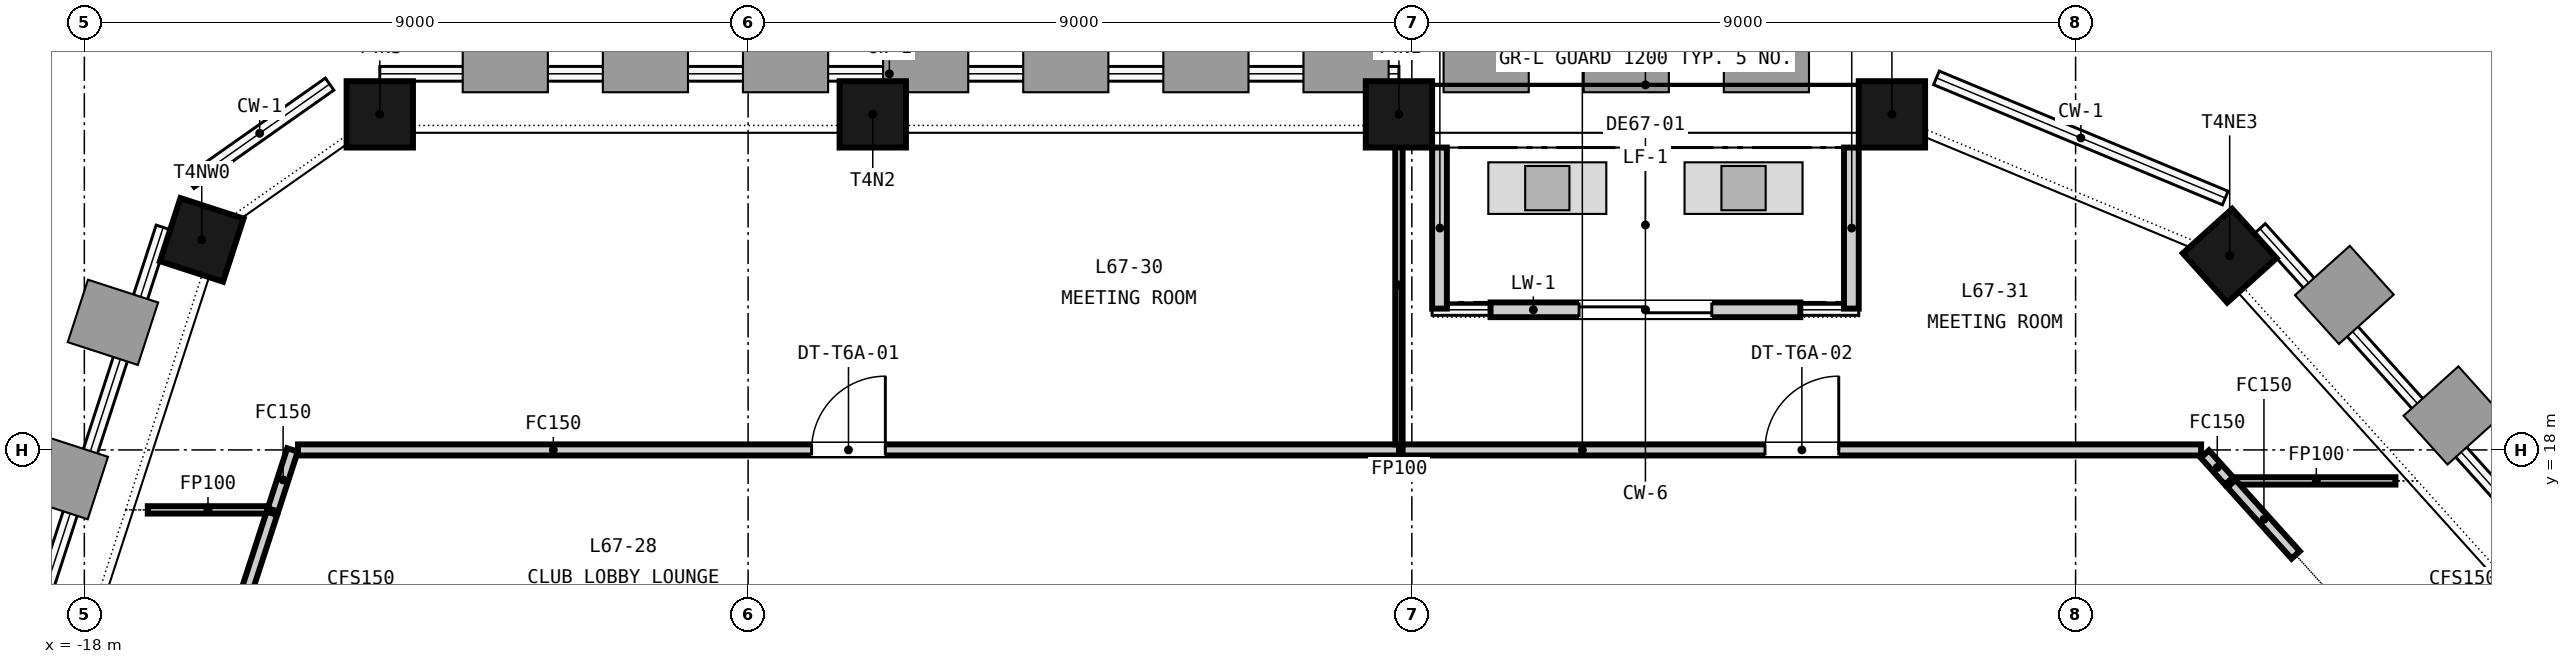
"""IFC4 building model, lengths in metres.
Left out: names, types, materials, properties, quantities, classifications, styles, units other than length and angle.
Written with IfcOpenShell. Run it as: python <this file> out.ifc"""

import sys

from ifc_helpers import new_model, si_unit, direction, frame, frame_2d, origin, origin_2d, place, context, subcontext, project, spatial, rectangle, extrude, element, fill, save


model = new_model("IFC4")
c1 = context("Model", 3, precision=1e-05, world=origin(), true_north=direction((0.0, 1.0)))
c2 = subcontext(c1, "Body", "Model", "MODEL_VIEW")
j1 = project(units=[si_unit("LENGTHUNIT", "METRE"), si_unit("PLANEANGLEUNIT", "RADIAN")], contexts=[c1])
p1 = place(None, origin())
s1 = spatial("IfcSite", under=j1, at=p1, CompositionType="ELEMENT")
p2 = place(p1, origin())
s2 = spatial("IfcBuilding", under=s1, at=p2, CompositionType="ELEMENT")
p3 = place(p2, frame((0.0, 0.0, 264.6)))
s3 = spatial("IfcBuildingStorey", under=s2, at=p3, CompositionType="ELEMENT", Elevation=264.6)
for number, where, z_axis, x_axis in (
    (1, (6.51, 22.55, -0.15), (0.0, 0.0, 1.0), (-1.0, 0.0, 0.0)),
    (2, (-0.175, 22.55, -0.15), (0.0, 0.0, 1.0), (-1.0, 0.0, 0.0)),
    (3, (-7.31, 22.55, -0.15), (0.0, 0.0, 1.0), (-1.0, 0.0, 0.0)),
    (4, (-13.994, 22.55, -0.15), (0.0, 0.0, 1.0), (-1.0, 0.0, 0.0)),
    (5, (-16.408, 20.848, -0.15), (0.0, 0.0, 1.0), (-0.309, -0.951, 0.0)),
    (6, (11.089, 20.633, -0.15), (0.0, 0.0, 1.0), (-0.669, 0.743, 0.0)),
):
    element("IfcColumn", number, at=place(p3, frame(where, z_axis=z_axis, x_axis=x_axis)), inside=s3, PredefinedType="COLUMN", context=c2, shape_type="SweptSolid", body=[
        extrude(rectangle(XDim=0.9, YDim=0.9, at=origin_2d()), origin(), (0.0, 0.0, 1.0), 3.65),
    ])
p4 = place(p3, frame((5.267, 19.9, 0.0), z_axis=(0.0, 0.0, 1.0), x_axis=(-1.0, 0.0, 0.0)))
e7 = element("IfcWall", 7, at=p4, inside=s3, PredefinedType="SOLIDWALL", context=c2, shape_type="SweptSolid", body=[
    extrude(rectangle(XDim=4.2, YDim=0.2, at=frame_2d((2.1, 0.0))), origin(), (0.0, 0.0, 1.0), 2.9),
])
p5 = place(p4, frame((1.2, 0.0, 0.0)))
e8 = element("IfcOpeningElement", 8, at=p5, cuts=e7, PredefinedType="OPENING", context=c2, shape_type="SweptSolid", body=[
    extrude(rectangle(XDim=1.8, YDim=2.4, at=frame_2d((0.9, 1.2))), frame((0.0, 0.11, 0.0), z_axis=(0.0, -1.0, 0.0), x_axis=(1.0, 0.0, 0.0)), (0.0, 0.0, 1.0), 0.22),
])
for number, where, z_axis, x_axis in (
    (9, (5.959, 22.1, 0.0), (0.0, 0.0, 1.0), (0.0, -1.0, 0.0)),
    (10, (0.375, 22.1, 0.0), (0.0, 0.0, 1.0), (0.0, -1.0, 0.0)),
):
    element("IfcWall", number, at=place(p3, frame(where, z_axis=z_axis, x_axis=x_axis)), inside=s3, PredefinedType="SOLIDWALL", context=c2, shape_type="SweptSolid", body=[
        extrude(rectangle(XDim=2.184, YDim=0.2, at=frame_2d((1.092, 0.0))), origin(), (0.0, 0.0, 1.0), 3.05),
    ])
p6 = place(p3, frame((-15.442, 17.187, 0.0), z_axis=(0.0, 0.0, 1.0), x_axis=(0.308763129345, 0.951138964588, 0.0)))
e11 = element("IfcWall", 11, at=p6, inside=s3, PredefinedType="PARTITIONING", context=c2, shape_type="SweptSolid", body=[
    extrude(rectangle(XDim=0.855, YDim=0.15, at=frame_2d((0.427, 0.0))), origin(), (0.0, 0.0, 1.0), 2.75),
])
p7 = place(p3, frame((-15.103, 18.0, 0.0), z_axis=(0.0, 0.0, 1.0), x_axis=(1.0, 0.0, 0.0)))
e12 = element("IfcWall", 12, at=p7, inside=s3, PredefinedType="PARTITIONING", context=c2, shape_type="SweptSolid", body=[
    extrude(rectangle(XDim=14.928, YDim=0.15, at=frame_2d((7.464, 0.0))), origin(), (0.0, 0.0, 1.0), 2.75),
])
p8 = place(p7, frame((6.964, 0.0, 0.0)))
e13 = element("IfcOpeningElement", 13, at=p8, cuts=e12, PredefinedType="OPENING", context=c2, shape_type="SweptSolid", body=[
    extrude(rectangle(XDim=1.0, YDim=2.1, at=frame_2d((0.5, 1.05))), frame((0.0, 0.085, 0.0), z_axis=(0.0, -1.0, 0.0), x_axis=(1.0, 0.0, 0.0)), (0.0, 0.0, 1.0), 0.17),
])
p9 = place(p3, frame((-0.175, 18.075, 0.0), z_axis=(0.0, 0.0, 1.0), x_axis=(0.0, 1.0, 0.0)))
e14 = element("IfcWall", 14, at=p9, inside=s3, PredefinedType="PARTITIONING", context=c2, shape_type="SweptSolid", body=[
    extrude(rectangle(XDim=4.325, YDim=0.1, at=frame_2d((2.163, 0.0))), origin(), (0.0, 0.0, 1.0), 2.75),
])
p10 = place(p3, frame((-17.14, 17.187, 0.0), z_axis=(0.0, 0.0, 1.0), x_axis=(1.0, 0.0, 0.0)))
e15 = element("IfcWall", 15, at=p10, inside=s3, PredefinedType="PARTITIONING", context=c2, shape_type="SweptSolid", body=[
    extrude(rectangle(XDim=1.623, YDim=0.1, at=frame_2d((0.812, 0.0))), origin(), (0.0, 0.0, 1.0), 2.75),
])
p11 = place(p3, frame((-0.125, 18.0, 0.0), z_axis=(0.0, 0.0, 1.0), x_axis=(1.0, 0.0, 0.0)))
e16 = element("IfcWall", 16, at=p11, inside=s3, PredefinedType="PARTITIONING", context=c2, shape_type="SweptSolid", body=[
    extrude(rectangle(XDim=10.827, YDim=0.15, at=frame_2d((5.414, 0.0))), origin(), (0.0, 0.0, 1.0), 2.75),
])
p12 = place(p11, frame((4.914, 0.0, 0.0)))
e17 = element("IfcOpeningElement", 17, at=p12, cuts=e16, PredefinedType="OPENING", context=c2, shape_type="SweptSolid", body=[
    extrude(rectangle(XDim=1.0, YDim=2.1, at=frame_2d((0.5, 1.05))), frame((0.0, 0.085, 0.0), z_axis=(0.0, -1.0, 0.0), x_axis=(1.0, 0.0, 0.0)), (0.0, 0.0, 1.0), 0.17),
])
p13 = place(p3, frame((10.752, 17.944, 0.0), z_axis=(0.0, 0.0, 1.0), x_axis=(0.669019774343, -0.74324460411, 0.0)))
e18 = element("IfcWall", 18, at=p13, inside=s3, PredefinedType="PARTITIONING", context=c2, shape_type="SweptSolid", body=[
    extrude(rectangle(XDim=0.49, YDim=0.15, at=frame_2d((0.245, 0.0))), origin(), (0.0, 0.0, 1.0), 2.75),
])
p14 = place(p3, frame((11.181, 17.58, 0.0), z_axis=(0.0, 0.0, 1.0), x_axis=(1.0, 0.0, 0.0)))
e19 = element("IfcWall", 19, at=p14, inside=s3, PredefinedType="PARTITIONING", context=c2, shape_type="SweptSolid", body=[
    extrude(rectangle(XDim=2.156, YDim=0.1, at=frame_2d((1.078, 0.0))), origin(), (0.0, 0.0, 1.0), 2.75),
])
p15 = place(p3, frame((11.114, 17.543, 0.0), z_axis=(0.0, 0.0, 1.0), x_axis=(0.669172057426, -0.743107500675, 0.0)))
e20 = element("IfcWall", 20, at=p15, inside=s3, PredefinedType="PARTITIONING", context=c2, shape_type="SweptSolid", body=[
    extrude(rectangle(XDim=1.301, YDim=0.15, at=frame_2d((0.65, 0.0))), origin(), (0.0, 0.0, 1.0), 2.75),
])
p16 = place(p3, frame((-17.377, 11.232, 0.0), z_axis=(0.0, 0.0, 1.0), x_axis=(0.309001632963, 0.951061507383, 0.0)))
e21 = element("IfcWall", 21, at=p16, inside=s3, PredefinedType="PARTITIONING", context=c2, shape_type="SweptSolid", body=[
    extrude(rectangle(XDim=6.211, YDim=0.15, at=frame_2d((3.105, 0.0))), origin(), (0.0, 0.0, 1.0), 2.75),
])
p17 = place(p5, origin())
e22 = element("IfcDoor", 22, at=p17, inside=s3, OperationType="SINGLE_SWING_LEFT", PredefinedType="DOOR", context=c2, shape_type="SweptSolid", body=[
    extrude(rectangle(XDim=1.8, YDim=2.4, at=frame_2d((0.9, 1.2))), frame((0.0, 0.025, 0.0), z_axis=(0.0, -1.0, 0.0), x_axis=(1.0, 0.0, 0.0)), (0.0, 0.0, 1.0), 0.05),
])
fill(e8, e22)
p18 = place(p8, origin())
e23 = element("IfcDoor", 23, at=p18, inside=s3, OperationType="SINGLE_SWING_RIGHT", PredefinedType="DOOR", context=c2, shape_type="SweptSolid", body=[
    extrude(rectangle(XDim=1.0, YDim=2.1, at=frame_2d((0.5, 1.05))), frame((0.0, 0.025, 0.0), z_axis=(0.0, -1.0, 0.0), x_axis=(1.0, 0.0, 0.0)), (0.0, 0.0, 1.0), 0.05),
])
fill(e13, e23)
p19 = place(p12, origin())
e24 = element("IfcDoor", 24, at=p19, inside=s3, OperationType="SINGLE_SWING_RIGHT", PredefinedType="DOOR", context=c2, shape_type="SweptSolid", body=[
    extrude(rectangle(XDim=1.0, YDim=2.1, at=frame_2d((0.5, 1.05))), frame((0.0, 0.025, 0.0), z_axis=(0.0, -1.0, 0.0), x_axis=(1.0, 0.0, 0.0)), (0.0, 0.0, 1.0), 0.05),
])
fill(e17, e24)
save(model, sys.argv[1])
